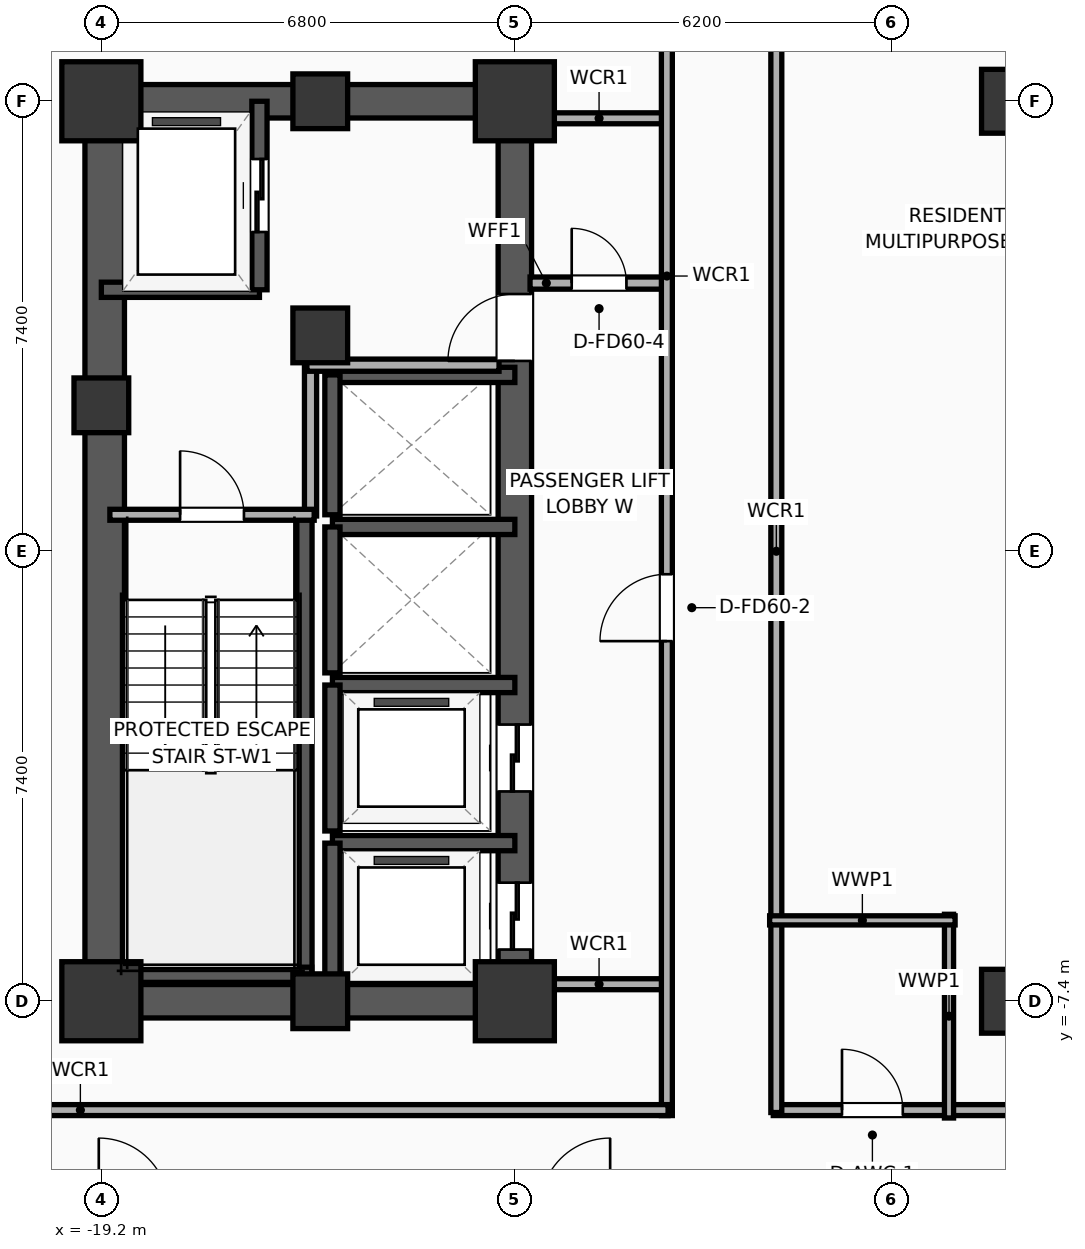
"""IFC4 building model, lengths in metres.
Left out: names, types, materials, properties, quantities, classifications, styles, units other than length and angle.
Written with IfcOpenShell. Run it as: python <this file> out.ifc"""

import sys

from ifc_helpers import new_model, si_unit, direction, frame, frame_2d, origin, origin_2d, place, context, subcontext, project, spatial, rectangle, extrude, element, fill, save


model = new_model("IFC4")
c1 = context("Model", 3, precision=1e-05, world=origin(), true_north=direction((0.0, 1.0)))
c2 = subcontext(c1, "Body", "Model", "MODEL_VIEW")
j1 = project(units=[si_unit("LENGTHUNIT", "METRE"), si_unit("PLANEANGLEUNIT", "RADIAN")], contexts=[c1])
p1 = place(None, origin())
s1 = spatial("IfcSite", under=j1, at=p1, CompositionType="ELEMENT")
p2 = place(p1, origin())
s2 = spatial("IfcBuilding", under=s1, at=p2, CompositionType="ELEMENT")
p3 = place(p2, frame((0.0, 0.0, 109.2)))
s3 = spatial("IfcBuildingStorey", under=s2, at=p3, CompositionType="ELEMENT", Elevation=109.2)
p4 = place(p3, frame((-19.2, -7.4, 0.0), z_axis=(0.0, 0.0, 1.0), x_axis=(1.0, 0.0, 0.0)))
e1 = element("IfcColumn", 1, at=p4, inside=s3, PredefinedType="COLUMN", context=c2, shape_type="SweptSolid", body=[
    extrude(rectangle(XDim=1.3, YDim=1.3, at=origin_2d()), origin(), (0.0, 0.0, 1.0), 3.9),
])
p5 = place(p3, frame((-19.2, 2.4, 0.0), z_axis=(0.0, 0.0, 1.0), x_axis=(1.0, 0.0, 0.0)))
e2 = element("IfcColumn", 2, at=p5, inside=s3, PredefinedType="COLUMN", context=c2, shape_type="SweptSolid", body=[
    extrude(rectangle(XDim=0.9, YDim=0.9, at=origin_2d()), origin(), (0.0, 0.0, 1.0), 3.9),
])
p6 = place(p3, frame((-19.2, 7.4, 0.0), z_axis=(0.0, 0.0, 1.0), x_axis=(1.0, 0.0, 0.0)))
e3 = element("IfcColumn", 3, at=p6, inside=s3, PredefinedType="COLUMN", context=c2, shape_type="SweptSolid", body=[
    extrude(rectangle(XDim=1.3, YDim=1.3, at=origin_2d()), origin(), (0.0, 0.0, 1.0), 3.9),
])
for number, where, z_axis, x_axis in (
    (4, (-15.6, -7.4, 0.0), (0.0, 0.0, 1.0), (1.0, 0.0, 0.0)),
    (5, (-15.6, 7.4, 0.0), (0.0, 0.0, 1.0), (1.0, 0.0, 0.0)),
):
    element("IfcColumn", number, at=place(p3, frame(where, z_axis=z_axis, x_axis=x_axis)), inside=s3, PredefinedType="COLUMN", context=c2, shape_type="SweptSolid", body=[
        extrude(rectangle(XDim=0.9, YDim=0.9, at=origin_2d()), origin(), (0.0, 0.0, 1.0), 3.9),
    ])
p7 = place(p3, frame((-12.4, -7.4, 0.0), z_axis=(0.0, 0.0, 1.0), x_axis=(1.0, 0.0, 0.0)))
e6 = element("IfcColumn", 6, at=p7, inside=s3, PredefinedType="COLUMN", context=c2, shape_type="SweptSolid", body=[
    extrude(rectangle(XDim=1.3, YDim=1.3, at=origin_2d()), origin(), (0.0, 0.0, 1.0), 3.9),
])
p8 = place(p3, frame((-15.6, 3.55, 0.0), z_axis=(0.0, 0.0, 1.0), x_axis=(1.0, 0.0, 0.0)))
e7 = element("IfcColumn", 7, at=p8, inside=s3, PredefinedType="COLUMN", context=c2, shape_type="SweptSolid", body=[
    extrude(rectangle(XDim=0.9, YDim=0.9, at=origin_2d()), origin(), (0.0, 0.0, 1.0), 3.9),
])
p9 = place(p3, frame((-12.4, 7.4, 0.0), z_axis=(0.0, 0.0, 1.0), x_axis=(1.0, 0.0, 0.0)))
e8 = element("IfcColumn", 8, at=p9, inside=s3, PredefinedType="COLUMN", context=c2, shape_type="SweptSolid", body=[
    extrude(rectangle(XDim=1.3, YDim=1.3, at=origin_2d()), origin(), (0.0, 0.0, 1.0), 3.9),
])
for number, where, z_axis, x_axis in (
    (9, (-19.475, -7.4, 0.0), (0.0, 0.0, 1.0), (1.0, 0.0, 0.0)),
    (10, (-19.475, 7.4, 0.0), (0.0, 0.0, 1.0), (1.0, 0.0, 0.0)),
):
    element("IfcWall", number, at=place(p3, frame(where, z_axis=z_axis, x_axis=x_axis)), inside=s3, PredefinedType="SHEAR", context=c2, shape_type="SweptSolid", body=[
        extrude(rectangle(XDim=7.35, YDim=0.55, at=frame_2d((3.675, 0.0))), origin(), (0.0, 0.0, 1.0), 3.65),
    ])
p10 = place(p3, frame((-19.145, -7.4, 0.0), z_axis=(0.0, 0.0, 1.0), x_axis=(0.0, 1.0, 0.0)))
e11 = element("IfcWall", 11, at=p10, inside=s3, PredefinedType="SHEAR", context=c2, shape_type="SweptSolid", body=[
    extrude(rectangle(XDim=14.8, YDim=0.65, at=frame_2d((7.4, 0.0))), origin(), (0.0, 0.0, 1.0), 3.65),
])
p11 = place(p3, frame((-12.4, -7.4, 0.0), z_axis=(0.0, 0.0, 1.0), x_axis=(0.0, 1.0, 0.0)))
e12 = element("IfcWall", 12, at=p11, inside=s3, PredefinedType="SHEAR", context=c2, shape_type="SweptSolid", body=[
    extrude(rectangle(XDim=14.8, YDim=0.55, at=frame_2d((7.4, 0.0))), origin(), (0.0, 0.0, 1.0), 3.65),
])
p12 = place(p11, frame((0.85, 0.0, 0.0)))
e13 = element("IfcOpeningElement", 13, at=p12, cuts=e12, PredefinedType="OPENING", context=c2, shape_type="SweptSolid", body=[
    extrude(rectangle(XDim=1.1, YDim=2.05, at=frame_2d((0.55, 1.025))), frame((0.0, 0.285, 0.0), z_axis=(0.0, -1.0, 0.0), x_axis=(1.0, 0.0, 0.0)), (0.0, 0.0, 1.0), 0.57),
])
p13 = place(p11, frame((3.45, 0.0, 0.0)))
e14 = element("IfcOpeningElement", 14, at=p13, cuts=e12, PredefinedType="OPENING", context=c2, shape_type="SweptSolid", body=[
    extrude(rectangle(XDim=1.1, YDim=2.05, at=frame_2d((0.55, 1.025))), frame((0.0, 0.285, 0.0), z_axis=(0.0, -1.0, 0.0), x_axis=(1.0, 0.0, 0.0)), (0.0, 0.0, 1.0), 0.57),
])
p14 = place(p11, frame((10.53, 0.0, 0.0)))
e15 = element("IfcOpeningElement", 15, at=p14, cuts=e12, PredefinedType="OPENING", context=c2, shape_type="SweptSolid", body=[
    extrude(rectangle(XDim=1.1, YDim=2.05, at=frame_2d((0.55, 1.025))), frame((0.0, 0.285, 0.0), z_axis=(0.0, -1.0, 0.0), x_axis=(1.0, 0.0, 0.0)), (0.0, 0.0, 1.0), 0.57),
])
p15 = place(p3, frame((-15.86, -7.085, 0.0), z_axis=(0.0, 0.0, 1.0), x_axis=(0.0, 1.0, 0.0)))
e16 = element("IfcWall", 16, at=p15, inside=s3, PredefinedType="SOLIDWALL", context=c2, shape_type="SweptSolid", body=[
    extrude(rectangle(XDim=7.685, YDim=0.25, at=frame_2d((3.843, 0.0))), origin(), (0.0, 0.0, 1.0), 3.65),
])
p16 = place(p3, frame((-19.2, -6.965, 0.0), z_axis=(0.0, 0.0, 1.0), x_axis=(1.0, 0.0, 0.0)))
e17 = element("IfcWall", 17, at=p16, inside=s3, PredefinedType="SOLIDWALL", context=c2, shape_type="SweptSolid", body=[
    extrude(rectangle(XDim=3.46, YDim=0.25, at=frame_2d((1.73, 0.0))), origin(), (0.0, 0.0, 1.0), 3.65),
])
for number, where, z_axis, x_axis in (
    (18, (-4.2, -7.4, 0.0), (0.0, 0.0, 1.0), (1.0, 0.0, 0.0)),
    (19, (-4.2, 7.4, 0.0), (0.0, 0.0, 1.0), (1.0, 0.0, 0.0)),
):
    element("IfcColumn", number, at=place(p3, frame(where, z_axis=z_axis, x_axis=x_axis)), inside=s3, PredefinedType="COLUMN", context=c2, shape_type="SweptSolid", body=[
        extrude(rectangle(XDim=1.05, YDim=1.05, at=origin_2d()), origin(), (0.0, 0.0, 1.0), 3.9),
    ])
p17 = place(p3, frame((-19.2, 4.3, 0.0), z_axis=(0.0, 0.0, 1.0), x_axis=(1.0, 0.0, 0.0)))
e20 = element("IfcWall", 20, at=p17, inside=s3, PredefinedType="SOLIDWALL", context=c2, shape_type="SweptSolid", body=[
    extrude(rectangle(XDim=2.6, YDim=0.25, at=frame_2d((1.3, 0.0))), origin(), (0.0, 0.0, 1.0), 3.65),
])
p18 = place(p3, frame((-16.6, 4.3, 0.0), z_axis=(0.0, 0.0, 1.0), x_axis=(0.0, 1.0, 0.0)))
e21 = element("IfcWall", 21, at=p18, inside=s3, PredefinedType="SOLIDWALL", context=c2, shape_type="SweptSolid", body=[
    extrude(rectangle(XDim=3.1, YDim=0.25, at=frame_2d((1.55, 0.0))), origin(), (0.0, 0.0, 1.0), 3.65),
])
p19 = place(p18, frame((0.95, 0.0, 0.0)))
e22 = element("IfcOpeningElement", 22, at=p19, cuts=e21, PredefinedType="OPENING", context=c2, shape_type="SweptSolid", body=[
    extrude(rectangle(XDim=1.2, YDim=2.05, at=frame_2d((0.6, 1.025))), frame((0.0, 0.135, 0.0), z_axis=(0.0, -1.0, 0.0), x_axis=(1.0, 0.0, 0.0)), (0.0, 0.0, 1.0), 0.27),
])
p20 = place(p3, frame((-12.4, -4.8, 0.0), z_axis=(0.0, 0.0, 1.0), x_axis=(-1.0, 0.0, 0.0)))
e23 = element("IfcWall", 23, at=p20, inside=s3, PredefinedType="SOLIDWALL", context=c2, shape_type="SweptSolid", body=[
    extrude(rectangle(XDim=3.0, YDim=0.25, at=frame_2d((1.5, 0.0))), origin(), (0.0, 0.0, 1.0), 3.65),
])
p21 = place(p3, frame((-15.4, -4.8, 0.0), z_axis=(0.0, 0.0, 1.0), x_axis=(0.0, -1.0, 0.0)))
e24 = element("IfcWall", 24, at=p21, inside=s3, PredefinedType="SOLIDWALL", context=c2, shape_type="SweptSolid", body=[
    extrude(rectangle(XDim=2.6, YDim=0.25, at=frame_2d((1.3, 0.0))), origin(), (0.0, 0.0, 1.0), 3.65),
])
p22 = place(p3, frame((-12.4, -2.2, 0.0), z_axis=(0.0, 0.0, 1.0), x_axis=(-1.0, 0.0, 0.0)))
e25 = element("IfcWall", 25, at=p22, inside=s3, PredefinedType="SOLIDWALL", context=c2, shape_type="SweptSolid", body=[
    extrude(rectangle(XDim=3.0, YDim=0.25, at=frame_2d((1.5, 0.0))), origin(), (0.0, 0.0, 1.0), 3.65),
])
p23 = place(p3, frame((-15.4, -2.2, 0.0), z_axis=(0.0, 0.0, 1.0), x_axis=(0.0, -1.0, 0.0)))
e26 = element("IfcWall", 26, at=p23, inside=s3, PredefinedType="SOLIDWALL", context=c2, shape_type="SweptSolid", body=[
    extrude(rectangle(XDim=2.4, YDim=0.25, at=frame_2d((1.2, 0.0))), origin(), (0.0, 0.0, 1.0), 3.65),
])
p24 = place(p3, frame((-12.4, 0.4, 0.0), z_axis=(0.0, 0.0, 1.0), x_axis=(-1.0, 0.0, 0.0)))
e27 = element("IfcWall", 27, at=p24, inside=s3, PredefinedType="SOLIDWALL", context=c2, shape_type="SweptSolid", body=[
    extrude(rectangle(XDim=3.0, YDim=0.25, at=frame_2d((1.5, 0.0))), origin(), (0.0, 0.0, 1.0), 3.65),
])
p25 = place(p3, frame((-15.4, 0.4, 0.0), z_axis=(0.0, 0.0, 1.0), x_axis=(0.0, -1.0, 0.0)))
e28 = element("IfcWall", 28, at=p25, inside=s3, PredefinedType="SOLIDWALL", context=c2, shape_type="SweptSolid", body=[
    extrude(rectangle(XDim=2.4, YDim=0.25, at=frame_2d((1.2, 0.0))), origin(), (0.0, 0.0, 1.0), 3.65),
])
p26 = place(p3, frame((-12.4, 2.9, 0.0), z_axis=(0.0, 0.0, 1.0), x_axis=(-1.0, 0.0, 0.0)))
e29 = element("IfcWall", 29, at=p26, inside=s3, PredefinedType="SOLIDWALL", context=c2, shape_type="SweptSolid", body=[
    extrude(rectangle(XDim=3.0, YDim=0.25, at=frame_2d((1.5, 0.0))), origin(), (0.0, 0.0, 1.0), 3.65),
])
p27 = place(p3, frame((-15.4, 2.9, 0.0), z_axis=(0.0, 0.0, 1.0), x_axis=(0.0, -1.0, 0.0)))
e30 = element("IfcWall", 30, at=p27, inside=s3, PredefinedType="SOLIDWALL", context=c2, shape_type="SweptSolid", body=[
    extrude(rectangle(XDim=2.3, YDim=0.25, at=frame_2d((1.15, 0.0))), origin(), (0.0, 0.0, 1.0), 3.65),
])
p28 = place(p3, frame((-15.76, 0.58, 0.0), z_axis=(0.0, 0.0, 1.0), x_axis=(0.0, 1.0, 0.0)))
e31 = element("IfcWall", 31, at=p28, inside=s3, PredefinedType="PARTITIONING", context=c2, shape_type="SweptSolid", body=[
    extrude(rectangle(XDim=2.52, YDim=0.2, at=frame_2d((1.26, 0.0))), origin(), (0.0, 0.0, 1.0), 3.65),
])
p29 = place(p3, frame((-15.82, 3.06, 0.0), z_axis=(0.0, 0.0, 1.0), x_axis=(1.0, 0.0, 0.0)))
e32 = element("IfcWall", 32, at=p29, inside=s3, PredefinedType="PARTITIONING", context=c2, shape_type="SweptSolid", body=[
    extrude(rectangle(XDim=3.16, YDim=0.2, at=frame_2d((1.58, 0.0))), origin(), (0.0, 0.0, 1.0), 3.65),
])
p30 = place(p3, frame((-19.06, 0.6, 0.0), z_axis=(0.0, 0.0, 1.0), x_axis=(1.0, 0.0, 0.0)))
e33 = element("IfcWall", 33, at=p30, inside=s3, PredefinedType="PARTITIONING", context=c2, shape_type="SweptSolid", body=[
    extrude(rectangle(XDim=3.36, YDim=0.18, at=frame_2d((1.68, 0.0))), origin(), (0.0, 0.0, 1.0), 3.65),
])
p31 = place(p30, frame((1.155, 0.0, 0.0)))
e34 = element("IfcOpeningElement", 34, at=p31, cuts=e33, PredefinedType="OPENING", context=c2, shape_type="SweptSolid", body=[
    extrude(rectangle(XDim=1.05, YDim=2.05, at=frame_2d((0.525, 1.025))), frame((0.0, 0.1, 0.0), z_axis=(0.0, -1.0, 0.0), x_axis=(1.0, 0.0, 0.0)), (0.0, 0.0, 1.0), 0.2),
])
p32 = place(p3, frame((-12.15, 4.41, 0.0), z_axis=(0.0, 0.0, 1.0), x_axis=(1.0, 0.0, 0.0)))
e35 = element("IfcWall", 35, at=p32, inside=s3, PredefinedType="PARTITIONING", context=c2, shape_type="SweptSolid", body=[
    extrude(rectangle(XDim=2.27, YDim=0.2, at=frame_2d((1.135, 0.0))), origin(), (0.0, 0.0, 1.0), 3.65),
])
p33 = place(p32, frame((0.685, 0.0, 0.0)))
e36 = element("IfcOpeningElement", 36, at=p33, cuts=e35, PredefinedType="OPENING", context=c2, shape_type="SweptSolid", body=[
    extrude(rectangle(XDim=0.9, YDim=2.05, at=frame_2d((0.45, 1.025))), frame((0.0, 0.11, 0.0), z_axis=(0.0, -1.0, 0.0), x_axis=(1.0, 0.0, 0.0)), (0.0, 0.0, 1.0), 0.22),
])
for number, where, z_axis, x_axis in (
    (37, (-12.15, 7.12, 0.0), (0.0, 0.0, 1.0), (1.0, 0.0, 0.0)),
    (38, (-12.15, -7.12, 0.0), (0.0, 0.0, 1.0), (1.0, 0.0, 0.0)),
):
    element("IfcWall", number, at=place(p3, frame(where, z_axis=z_axis, x_axis=x_axis)), inside=s3, PredefinedType="PARTITIONING", context=c2, shape_type="SweptSolid", body=[
        extrude(rectangle(XDim=2.27, YDim=0.18, at=frame_2d((1.135, 0.0))), origin(), (0.0, 0.0, 1.0), 3.65),
    ])
p34 = place(p3, frame((-9.9, -9.28, 0.0), z_axis=(0.0, 0.0, 1.0), x_axis=(0.0, 1.0, 0.0)))
e39 = element("IfcWall", 39, at=p34, inside=s3, PredefinedType="PARTITIONING", context=c2, shape_type="SweptSolid", body=[
    extrude(rectangle(XDim=18.56, YDim=0.18, at=frame_2d((9.28, 0.0))), origin(), (0.0, 0.0, 1.0), 3.65),
])
p35 = place(p34, frame((7.802, 0.0, 0.0)))
e40 = element("IfcOpeningElement", 40, at=p35, cuts=e39, PredefinedType="OPENING", context=c2, shape_type="SweptSolid", body=[
    extrude(rectangle(XDim=1.1, YDim=2.05, at=frame_2d((0.55, 1.025))), frame((0.0, 0.1, 0.0), z_axis=(0.0, -1.0, 0.0), x_axis=(1.0, 0.0, 0.0)), (0.0, 0.0, 1.0), 0.2),
])
p36 = place(p3, frame((-29.21, -9.19, 0.0), z_axis=(0.0, 0.0, 1.0), x_axis=(1.0, 0.0, 0.0)))
e41 = element("IfcWall", 41, at=p36, inside=s3, PredefinedType="PARTITIONING", context=c2, shape_type="SweptSolid", body=[
    extrude(rectangle(XDim=19.33, YDim=0.18, at=frame_2d((9.665, 0.0))), origin(), (0.0, 0.0, 1.0), 3.65),
])
p37 = place(p3, frame((-8.15, -9.19, 0.0), z_axis=(0.0, 0.0, 1.0), x_axis=(1.0, 0.0, 0.0)))
e42 = element("IfcWall", 42, at=p37, inside=s3, PredefinedType="PARTITIONING", context=c2, shape_type="SweptSolid", body=[
    extrude(rectangle(XDim=16.3, YDim=0.18, at=frame_2d((8.15, 0.0))), origin(), (0.0, 0.0, 1.0), 3.65),
])
p38 = place(p37, frame((1.13, 0.0, 0.0)))
e43 = element("IfcOpeningElement", 43, at=p38, cuts=e42, PredefinedType="OPENING", context=c2, shape_type="SweptSolid", body=[
    extrude(rectangle(XDim=1.0, YDim=2.05, at=frame_2d((0.5, 1.025))), frame((0.0, 0.1, 0.0), z_axis=(0.0, -1.0, 0.0), x_axis=(1.0, 0.0, 0.0)), (0.0, 0.0, 1.0), 0.2),
])
p39 = place(p37, frame((10.12, 0.0, 0.0)))
e44 = element("IfcOpeningElement", 44, at=p39, cuts=e42, PredefinedType="OPENING", context=c2, shape_type="SweptSolid", body=[
    extrude(rectangle(XDim=0.95, YDim=2.05, at=frame_2d((0.475, 1.025))), frame((0.0, 0.1, 0.0), z_axis=(0.0, -1.0, 0.0), x_axis=(1.0, 0.0, 0.0)), (0.0, 0.0, 1.0), 0.2),
])
p40 = place(p3, frame((-8.1, -9.23, 0.0), z_axis=(0.0, 0.0, 1.0), x_axis=(0.0, 1.0, 0.0)))
e45 = element("IfcWall", 45, at=p40, inside=s3, PredefinedType="PARTITIONING", context=c2, shape_type="SweptSolid", body=[
    extrude(rectangle(XDim=18.46, YDim=0.18, at=frame_2d((9.23, 0.0))), origin(), (0.0, 0.0, 1.0), 3.65),
])
p41 = place(p3, frame((-5.26, -9.32, 0.0), z_axis=(0.0, 0.0, 1.0), x_axis=(0.0, 1.0, 0.0)))
e46 = element("IfcWall", 46, at=p41, inside=s3, PredefinedType="PLUMBINGWALL", context=c2, shape_type="SweptSolid", body=[
    extrude(rectangle(XDim=3.35, YDim=0.15, at=frame_2d((1.675, 0.0))), origin(), (0.0, 0.0, 1.0), 3.65),
])
p42 = place(p3, frame((-8.21, -6.07, 0.0), z_axis=(0.0, 0.0, 1.0), x_axis=(1.0, 0.0, 0.0)))
e47 = element("IfcWall", 47, at=p42, inside=s3, PredefinedType="PLUMBINGWALL", context=c2, shape_type="SweptSolid", body=[
    extrude(rectangle(XDim=3.05, YDim=0.15, at=frame_2d((1.525, 0.0))), origin(), (0.0, 0.0, 1.0), 3.65),
])
p43 = place(p19, origin())
e48 = element("IfcDoor", 48, at=p43, inside=s3, OperationType="SLIDING_TO_LEFT", PredefinedType="DOOR", context=c2, shape_type="SweptSolid", body=[
    extrude(rectangle(XDim=1.2, YDim=2.05, at=frame_2d((0.6, 1.025))), frame((0.0, 0.025, 0.0), z_axis=(0.0, -1.0, 0.0), x_axis=(1.0, 0.0, 0.0)), (0.0, 0.0, 1.0), 0.05),
])
fill(e22, e48)
p44 = place(p12, origin())
e49 = element("IfcDoor", 49, at=p44, inside=s3, OperationType="SLIDING_TO_LEFT", PredefinedType="DOOR", context=c2, shape_type="SweptSolid", body=[
    extrude(rectangle(XDim=1.1, YDim=2.05, at=frame_2d((0.55, 1.025))), frame((0.0, 0.025, 0.0), z_axis=(0.0, -1.0, 0.0), x_axis=(1.0, 0.0, 0.0)), (0.0, 0.0, 1.0), 0.05),
])
fill(e13, e49)
p45 = place(p13, origin())
e50 = element("IfcDoor", 50, at=p45, inside=s3, OperationType="SLIDING_TO_LEFT", PredefinedType="DOOR", context=c2, shape_type="SweptSolid", body=[
    extrude(rectangle(XDim=1.1, YDim=2.05, at=frame_2d((0.55, 1.025))), frame((0.0, 0.025, 0.0), z_axis=(0.0, -1.0, 0.0), x_axis=(1.0, 0.0, 0.0)), (0.0, 0.0, 1.0), 0.05),
])
fill(e14, e50)
p46 = place(p31, origin())
e51 = element("IfcDoor", 51, at=p46, inside=s3, OperationType="SINGLE_SWING_LEFT", PredefinedType="DOOR", context=c2, shape_type="SweptSolid", body=[
    extrude(rectangle(XDim=1.05, YDim=2.05, at=frame_2d((0.525, 1.025))), frame((0.0, 0.025, 0.0), z_axis=(0.0, -1.0, 0.0), x_axis=(1.0, 0.0, 0.0)), (0.0, 0.0, 1.0), 0.05),
])
fill(e34, e51)
p47 = place(p33, origin())
e52 = element("IfcDoor", 52, at=p47, inside=s3, OperationType="SINGLE_SWING_LEFT", PredefinedType="DOOR", context=c2, shape_type="SweptSolid", body=[
    extrude(rectangle(XDim=0.9, YDim=2.05, at=frame_2d((0.45, 1.025))), frame((0.0, 0.025, 0.0), z_axis=(0.0, -1.0, 0.0), x_axis=(1.0, 0.0, 0.0)), (0.0, 0.0, 1.0), 0.05),
])
fill(e36, e52)
p48 = place(p35, origin())
e53 = element("IfcDoor", 53, at=p48, inside=s3, OperationType="SINGLE_SWING_LEFT", PredefinedType="DOOR", context=c2, shape_type="SweptSolid", body=[
    extrude(rectangle(XDim=1.1, YDim=2.05, at=frame_2d((0.55, 1.025))), frame((0.0, 0.025, 0.0), z_axis=(0.0, -1.0, 0.0), x_axis=(1.0, 0.0, 0.0)), (0.0, 0.0, 1.0), 0.05),
])
fill(e40, e53)
p49 = place(p38, origin())
e54 = element("IfcDoor", 54, at=p49, inside=s3, OperationType="SINGLE_SWING_LEFT", PredefinedType="DOOR", context=c2, shape_type="SweptSolid", body=[
    extrude(rectangle(XDim=1.0, YDim=2.05, at=frame_2d((0.5, 1.025))), frame((0.0, 0.025, 0.0), z_axis=(0.0, -1.0, 0.0), x_axis=(1.0, 0.0, 0.0)), (0.0, 0.0, 1.0), 0.05),
])
fill(e43, e54)
p50 = place(p14, origin())
e55 = element("IfcDoor", 55, at=p50, inside=s3, OperationType="SINGLE_SWING_LEFT", PredefinedType="DOOR", context=c2, shape_type="SweptSolid", body=[
    extrude(rectangle(XDim=1.1, YDim=2.05, at=frame_2d((0.55, 1.025))), frame((0.0, 0.025, 0.0), z_axis=(0.0, -1.0, 0.0), x_axis=(1.0, 0.0, 0.0)), (0.0, 0.0, 1.0), 0.05),
])
fill(e15, e55)
save(model, sys.argv[1])
